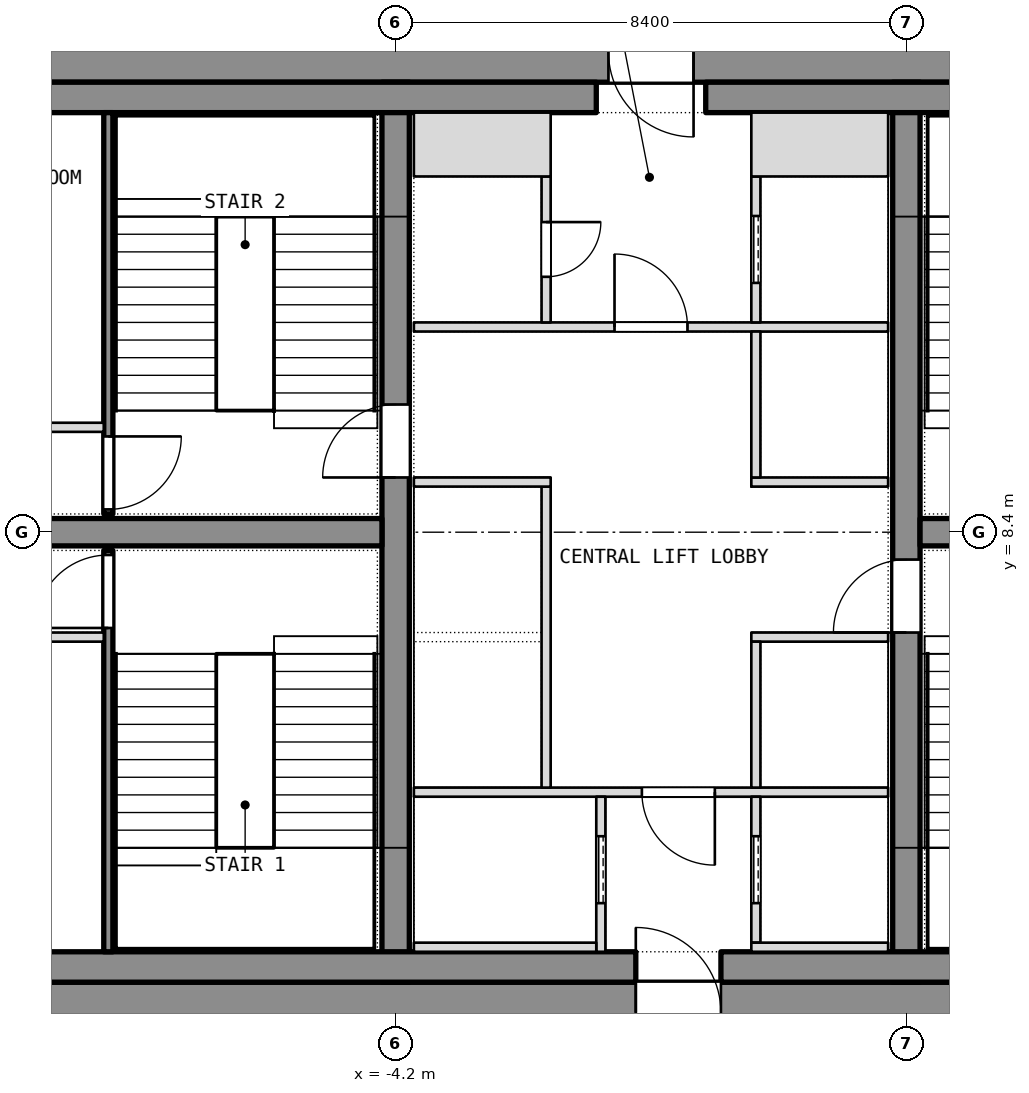
"""IFC4 building model, lengths in metres.
Left out: names, types, materials, properties, quantities, classifications, styles, units other than length and angle.
Written with IfcOpenShell. Run it as: python <this file> out.ifc"""

import sys

from ifc_helpers import new_model, si_unit, direction, frame, frame_2d, origin, place, context, subcontext, project, spatial, rectangle, extrude, element, fill, save


model = new_model("IFC4")
c1 = context("Model", 3, precision=1e-05, world=origin(), true_north=direction((0.0, 1.0)))
c2 = subcontext(c1, "Body", "Model", "MODEL_VIEW")
j1 = project(units=[si_unit("LENGTHUNIT", "METRE"), si_unit("PLANEANGLEUNIT", "RADIAN")], contexts=[c1])
p1 = place(None, origin())
s1 = spatial("IfcSite", under=j1, at=p1, CompositionType="ELEMENT")
p2 = place(p1, origin())
s2 = spatial("IfcBuilding", under=s1, at=p2, CompositionType="ELEMENT")
p3 = place(p2, frame((0.0, 0.0, 133.7)))
s3 = spatial("IfcBuildingStorey", under=s2, at=p3, CompositionType="ELEMENT", Elevation=133.7)
p4 = place(p3, frame((-11.1, 0.5, 0.0), z_axis=(0.0, 0.0, 1.0), x_axis=(1.0, 0.0, 0.0)))
e1 = element("IfcWall", 1, at=p4, inside=s3, PredefinedType="SHEAR", context=c2, shape_type="SweptSolid", body=[
    extrude(rectangle(XDim=22.2, YDim=1.0, at=frame_2d((11.1, 0.0))), origin(), (0.0, 0.0, 1.0), 3.6),
])
p5 = place(p4, frame((10.85, 0.0, 0.0)))
e2 = element("IfcOpeningElement", 2, at=p5, cuts=e1, PredefinedType="OPENING", context=c2, shape_type="SweptSolid", body=[
    extrude(rectangle(XDim=1.4, YDim=2.1, at=frame_2d((0.7, 1.05))), frame((0.0, 0.5, 0.0), z_axis=(0.0, -1.0, 0.0), x_axis=(1.0, 0.0, 0.0)), (0.0, 0.0, 1.0), 1.0),
])
p6 = place(p3, frame((-11.1, 16.3, 0.0), z_axis=(0.0, 0.0, 1.0), x_axis=(1.0, 0.0, 0.0)))
e3 = element("IfcWall", 3, at=p6, inside=s3, PredefinedType="SHEAR", context=c2, shape_type="SweptSolid", body=[
    extrude(rectangle(XDim=22.2, YDim=1.0, at=frame_2d((11.1, 0.0))), origin(), (0.0, 0.0, 1.0), 3.6),
])
p7 = place(p6, frame((10.4, 0.0, 0.0)))
e4 = element("IfcOpeningElement", 4, at=p7, cuts=e3, PredefinedType="OPENING", context=c2, shape_type="SweptSolid", body=[
    extrude(rectangle(XDim=1.4, YDim=2.1, at=frame_2d((0.7, 1.05))), frame((0.0, 0.5, 0.0), z_axis=(0.0, -1.0, 0.0), x_axis=(1.0, 0.0, 0.0)), (0.0, 0.0, 1.0), 1.0),
])
p8 = place(p3, frame((-4.2, 1.0, 0.0), z_axis=(0.0, 0.0, 1.0), x_axis=(0.0, 1.0, 0.0)))
e5 = element("IfcWall", 5, at=p8, inside=s3, PredefinedType="SHEAR", context=c2, shape_type="SweptSolid", body=[
    extrude(rectangle(XDim=14.8, YDim=0.45, at=frame_2d((7.4, 0.0))), origin(), (0.0, 0.0, 1.0), 3.6),
])
p9 = place(p8, frame((8.3, 0.0, 0.0)))
e6 = element("IfcOpeningElement", 6, at=p9, cuts=e5, PredefinedType="OPENING", context=c2, shape_type="SweptSolid", body=[
    extrude(rectangle(XDim=1.2, YDim=2.1, at=frame_2d((0.6, 1.05))), frame((0.0, 0.225, 0.0), z_axis=(0.0, -1.0, 0.0), x_axis=(1.0, 0.0, 0.0)), (0.0, 0.0, 1.0), 0.45),
])
p10 = place(p3, frame((4.2, 1.0, 0.0), z_axis=(0.0, 0.0, 1.0), x_axis=(0.0, 1.0, 0.0)))
e7 = element("IfcWall", 7, at=p10, inside=s3, PredefinedType="SHEAR", context=c2, shape_type="SweptSolid", body=[
    extrude(rectangle(XDim=14.8, YDim=0.45, at=frame_2d((7.4, 0.0))), origin(), (0.0, 0.0, 1.0), 3.6),
])
p11 = place(p10, frame((5.75, 0.0, 0.0)))
e8 = element("IfcOpeningElement", 8, at=p11, cuts=e7, PredefinedType="OPENING", context=c2, shape_type="SweptSolid", body=[
    extrude(rectangle(XDim=1.2, YDim=2.1, at=frame_2d((0.6, 1.05))), frame((0.0, 0.225, 0.0), z_axis=(0.0, -1.0, 0.0), x_axis=(1.0, 0.0, 0.0)), (0.0, 0.0, 1.0), 0.45),
])
for number, where, z_axis, x_axis in (
    (9, (-11.1, 8.4, 0.0), (0.0, 0.0, 1.0), (1.0, 0.0, 0.0)),
    (10, (4.425, 8.4, 0.0), (0.0, 0.0, 1.0), (1.0, 0.0, 0.0)),
):
    element("IfcWall", number, at=place(p3, frame(where, z_axis=z_axis, x_axis=x_axis)), inside=s3, PredefinedType="SHEAR", context=c2, shape_type="SweptSolid", body=[
        extrude(rectangle(XDim=6.675, YDim=0.45, at=frame_2d((3.337, 0.0))), origin(), (0.0, 0.0, 1.0), 3.6),
    ])
p12 = place(p3, frame((-11.1, 1.25, 0.0), z_axis=(0.0, 0.0, 1.0), x_axis=(1.0, 0.0, 0.0)))
e11 = element("IfcWall", 11, at=p12, inside=s3, PredefinedType="PARTITIONING", context=c2, shape_type="SweptSolid", body=[
    extrude(rectangle(XDim=10.85, YDim=0.5, at=frame_2d((5.425, 0.0))), origin(), (0.0, 0.0, 1.0), 3.34),
])
p13 = place(p3, frame((1.15, 1.25, 0.0), z_axis=(0.0, 0.0, 1.0), x_axis=(1.0, 0.0, 0.0)))
e12 = element("IfcWall", 12, at=p13, inside=s3, PredefinedType="PARTITIONING", context=c2, shape_type="SweptSolid", body=[
    extrude(rectangle(XDim=9.95, YDim=0.5, at=frame_2d((4.975, 0.0))), origin(), (0.0, 0.0, 1.0), 3.34),
])
for number, where, z_axis, x_axis in (
    (13, (-11.1, 15.55, 0.0), (0.0, 0.0, 1.0), (1.0, 0.0, 0.0)),
    (14, (0.9, 15.55, 0.0), (0.0, 0.0, 1.0), (1.0, 0.0, 0.0)),
):
    element("IfcWall", number, at=place(p3, frame(where, z_axis=z_axis, x_axis=x_axis)), inside=s3, PredefinedType="PARTITIONING", context=c2, shape_type="SweptSolid", body=[
        extrude(rectangle(XDim=10.2, YDim=0.5, at=frame_2d((5.1, 0.0))), origin(), (0.0, 0.0, 1.0), 3.34),
    ])
p14 = place(p3, frame((-8.925, 1.5, 0.0), z_axis=(0.0, 0.0, 1.0), x_axis=(0.0, 1.0, 0.0)))
e15 = element("IfcWall", 15, at=p14, inside=s3, PredefinedType="SHEAR", context=c2, shape_type="SweptSolid", body=[
    extrude(rectangle(XDim=6.6, YDim=0.15, at=frame_2d((3.3, 0.0))), origin(), (0.0, 0.0, 1.0), 3.34),
])
p15 = place(p14, frame((5.325, 0.0, 0.0)))
e16 = element("IfcOpeningElement", 16, at=p15, cuts=e15, PredefinedType="OPENING", context=c2, shape_type="SweptSolid", body=[
    extrude(rectangle(XDim=1.2, YDim=2.1, at=frame_2d((0.6, 1.05))), frame((0.0, 0.075, 0.0), z_axis=(0.0, -1.0, 0.0), x_axis=(1.0, 0.0, 0.0)), (0.0, 0.0, 1.0), 0.15),
])
p16 = place(p3, frame((-11.1, 6.675, 0.0), z_axis=(0.0, 0.0, 1.0), x_axis=(1.0, 0.0, 0.0)))
e17 = element("IfcWall", 17, at=p16, inside=s3, PredefinedType="PARTITIONING", context=c2, shape_type="SweptSolid", body=[
    extrude(rectangle(XDim=2.1, YDim=0.15, at=frame_2d((1.05, 0.0))), origin(), (0.0, 0.0, 1.0), 3.34),
])
p17 = place(p3, frame((-8.925, 8.7, 0.0), z_axis=(0.0, 0.0, 1.0), x_axis=(0.0, 1.0, 0.0)))
e18 = element("IfcWall", 18, at=p17, inside=s3, PredefinedType="SHEAR", context=c2, shape_type="SweptSolid", body=[
    extrude(rectangle(XDim=6.6, YDim=0.15, at=frame_2d((3.3, 0.0))), origin(), (0.0, 0.0, 1.0), 3.34),
])
p18 = place(p17, frame((0.075, 0.0, 0.0)))
e19 = element("IfcOpeningElement", 19, at=p18, cuts=e18, PredefinedType="OPENING", context=c2, shape_type="SweptSolid", body=[
    extrude(rectangle(XDim=1.2, YDim=2.1, at=frame_2d((0.6, 1.05))), frame((0.0, 0.075, 0.0), z_axis=(0.0, -1.0, 0.0), x_axis=(1.0, 0.0, 0.0)), (0.0, 0.0, 1.0), 0.15),
])
p19 = place(p3, frame((-11.1, 10.125, 0.0), z_axis=(0.0, 0.0, 1.0), x_axis=(1.0, 0.0, 0.0)))
e20 = element("IfcWall", 20, at=p19, inside=s3, PredefinedType="PARTITIONING", context=c2, shape_type="SweptSolid", body=[
    extrude(rectangle(XDim=2.1, YDim=0.15, at=frame_2d((1.05, 0.0))), origin(), (0.0, 0.0, 1.0), 3.34),
])
p20 = place(p3, frame((-3.9, 4.125, 0.0), z_axis=(0.0, 0.0, 1.0), x_axis=(1.0, 0.0, 0.0)))
e21 = element("IfcWall", 21, at=p20, inside=s3, PredefinedType="PARTITIONING", context=c2, shape_type="SweptSolid", body=[
    extrude(rectangle(XDim=7.8, YDim=0.15, at=frame_2d((3.9, 0.0))), origin(), (0.0, 0.0, 1.0), 3.34),
])
p21 = place(p20, frame((3.75, 0.0, 0.0)))
e22 = element("IfcOpeningElement", 22, at=p21, cuts=e21, PredefinedType="OPENING", context=c2, shape_type="SweptSolid", body=[
    extrude(rectangle(XDim=1.2, YDim=2.1, at=frame_2d((0.6, 1.05))), frame((0.0, 0.075, 0.0), z_axis=(0.0, -1.0, 0.0), x_axis=(1.0, 0.0, 0.0)), (0.0, 0.0, 1.0), 0.15),
])
p22 = place(p3, frame((-3.9, 11.775, 0.0), z_axis=(0.0, 0.0, 1.0), x_axis=(1.0, 0.0, 0.0)))
e23 = element("IfcWall", 23, at=p22, inside=s3, PredefinedType="PARTITIONING", context=c2, shape_type="SweptSolid", body=[
    extrude(rectangle(XDim=7.8, YDim=0.15, at=frame_2d((3.9, 0.0))), origin(), (0.0, 0.0, 1.0), 3.34),
])
p23 = place(p22, frame((3.3, 0.0, 0.0)))
e24 = element("IfcOpeningElement", 24, at=p23, cuts=e23, PredefinedType="OPENING", context=c2, shape_type="SweptSolid", body=[
    extrude(rectangle(XDim=1.2, YDim=2.1, at=frame_2d((0.6, 1.05))), frame((0.0, 0.075, 0.0), z_axis=(0.0, -1.0, 0.0), x_axis=(1.0, 0.0, 0.0)), (0.0, 0.0, 1.0), 0.15),
])
p24 = place(p3, frame((-0.825, 1.5, 0.0), z_axis=(0.0, 0.0, 1.0), x_axis=(0.0, 1.0, 0.0)))
e25 = element("IfcWall", 25, at=p24, inside=s3, PredefinedType="SHEAR", context=c2, shape_type="SweptSolid", body=[
    extrude(rectangle(XDim=2.55, YDim=0.15, at=frame_2d((1.275, 0.0))), origin(), (0.0, 0.0, 1.0), 3.6),
])
p25 = place(p24, frame((0.8, 0.0, 0.0)))
e26 = element("IfcOpeningElement", 26, at=p25, cuts=e25, PredefinedType="OPENING", context=c2, shape_type="SweptSolid", body=[
    extrude(rectangle(XDim=1.1, YDim=2.1, at=frame_2d((0.55, 1.05))), frame((0.0, 0.075, 0.0), z_axis=(0.0, -1.0, 0.0), x_axis=(1.0, 0.0, 0.0)), (0.0, 0.0, 1.0), 0.15),
])
p26 = place(p3, frame((-3.9, 1.575, 0.0), z_axis=(0.0, 0.0, 1.0), x_axis=(1.0, 0.0, 0.0)))
e27 = element("IfcWall", 27, at=p26, inside=s3, PredefinedType="SHEAR", context=c2, shape_type="SweptSolid", body=[
    extrude(rectangle(XDim=3.0, YDim=0.15, at=frame_2d((1.5, 0.0))), origin(), (0.0, 0.0, 1.0), 3.6),
])
p27 = place(p3, frame((-1.725, 4.2, 0.0), z_axis=(0.0, 0.0, 1.0), x_axis=(0.0, 1.0, 0.0)))
e28 = element("IfcWall", 28, at=p27, inside=s3, PredefinedType="SHEAR", context=c2, shape_type="SweptSolid", body=[
    extrude(rectangle(XDim=4.95, YDim=0.15, at=frame_2d((2.475, 0.0))), origin(), (0.0, 0.0, 1.0), 3.6),
])
p28 = place(p3, frame((-3.9, 9.225, 0.0), z_axis=(0.0, 0.0, 1.0), x_axis=(1.0, 0.0, 0.0)))
e29 = element("IfcWall", 29, at=p28, inside=s3, PredefinedType="SHEAR", context=c2, shape_type="SweptSolid", body=[
    extrude(rectangle(XDim=2.25, YDim=0.15, at=frame_2d((1.125, 0.0))), origin(), (0.0, 0.0, 1.0), 3.6),
])
p29 = place(p3, frame((-1.725, 11.85, 0.0), z_axis=(0.0, 0.0, 1.0), x_axis=(0.0, 1.0, 0.0)))
e30 = element("IfcWall", 30, at=p29, inside=s3, PredefinedType="PARTITIONING", context=c2, shape_type="SweptSolid", body=[
    extrude(rectangle(XDim=2.4, YDim=0.15, at=frame_2d((1.2, 0.0))), origin(), (0.0, 0.0, 1.0), 3.34),
])
p30 = place(p29, frame((0.75, 0.0, 0.0)))
e31 = element("IfcOpeningElement", 31, at=p30, cuts=e30, PredefinedType="OPENING", context=c2, shape_type="SweptSolid", body=[
    extrude(rectangle(XDim=0.9, YDim=2.1, at=frame_2d((0.45, 1.05))), frame((0.0, 0.075, 0.0), z_axis=(0.0, -1.0, 0.0), x_axis=(1.0, 0.0, 0.0)), (0.0, 0.0, 1.0), 0.15),
])
p31 = place(p3, frame((-3.9, 14.775, 0.0), z_axis=(0.0, 0.0, 1.0), x_axis=(1.0, 0.0, 0.0)))
e32 = element("IfcWall", 32, at=p31, inside=s3, PredefinedType="PARTITIONING", context=c2, shape_type="SweptSolid", body=[
    extrude(rectangle(XDim=2.25, YDim=1.05, at=frame_2d((1.125, 0.0))), origin(), (0.0, 0.0, 1.0), 3.34),
])
p32 = place(p3, frame((1.725, 1.65, 0.0), z_axis=(0.0, 0.0, 1.0), x_axis=(0.0, 1.0, 0.0)))
e33 = element("IfcWall", 33, at=p32, inside=s3, PredefinedType="SHEAR", context=c2, shape_type="SweptSolid", body=[
    extrude(rectangle(XDim=2.4, YDim=0.15, at=frame_2d((1.2, 0.0))), origin(), (0.0, 0.0, 1.0), 3.6),
])
p33 = place(p32, frame((0.65, 0.0, 0.0)))
e34 = element("IfcOpeningElement", 34, at=p33, cuts=e33, PredefinedType="OPENING", context=c2, shape_type="SweptSolid", body=[
    extrude(rectangle(XDim=1.1, YDim=2.1, at=frame_2d((0.55, 1.05))), frame((0.0, 0.075, 0.0), z_axis=(0.0, -1.0, 0.0), x_axis=(1.0, 0.0, 0.0)), (0.0, 0.0, 1.0), 0.15),
])
p34 = place(p3, frame((1.65, 1.575, 0.0), z_axis=(0.0, 0.0, 1.0), x_axis=(1.0, 0.0, 0.0)))
e35 = element("IfcWall", 35, at=p34, inside=s3, PredefinedType="SHEAR", context=c2, shape_type="SweptSolid", body=[
    extrude(rectangle(XDim=2.25, YDim=0.15, at=frame_2d((1.125, 0.0))), origin(), (0.0, 0.0, 1.0), 3.6),
])
p35 = place(p3, frame((1.725, 11.85, 0.0), z_axis=(0.0, 0.0, 1.0), x_axis=(0.0, 1.0, 0.0)))
e36 = element("IfcWall", 36, at=p35, inside=s3, PredefinedType="SHEAR", context=c2, shape_type="SweptSolid", body=[
    extrude(rectangle(XDim=2.4, YDim=0.15, at=frame_2d((1.2, 0.0))), origin(), (0.0, 0.0, 1.0), 3.6),
])
p36 = place(p35, frame((0.65, 0.0, 0.0)))
e37 = element("IfcOpeningElement", 37, at=p36, cuts=e36, PredefinedType="OPENING", context=c2, shape_type="SweptSolid", body=[
    extrude(rectangle(XDim=1.1, YDim=2.1, at=frame_2d((0.55, 1.05))), frame((0.0, 0.075, 0.0), z_axis=(0.0, -1.0, 0.0), x_axis=(1.0, 0.0, 0.0)), (0.0, 0.0, 1.0), 0.15),
])
p37 = place(p3, frame((1.65, 14.775, 0.0), z_axis=(0.0, 0.0, 1.0), x_axis=(1.0, 0.0, 0.0)))
e38 = element("IfcWall", 38, at=p37, inside=s3, PredefinedType="SHEAR", context=c2, shape_type="SweptSolid", body=[
    extrude(rectangle(XDim=2.25, YDim=1.05, at=frame_2d((1.125, 0.0))), origin(), (0.0, 0.0, 1.0), 3.6),
])
for number, where, z_axis, x_axis in (
    (39, (1.65, 6.675, 0.0), (0.0, 0.0, 1.0), (1.0, 0.0, 0.0)),
    (40, (1.65, 9.225, 0.0), (0.0, 0.0, 1.0), (1.0, 0.0, 0.0)),
):
    element("IfcWall", number, at=place(p3, frame(where, z_axis=z_axis, x_axis=x_axis)), inside=s3, PredefinedType="SHEAR", context=c2, shape_type="SweptSolid", body=[
        extrude(rectangle(XDim=2.25, YDim=0.15, at=frame_2d((1.125, 0.0))), origin(), (0.0, 0.0, 1.0), 3.6),
    ])
p38 = place(p3, frame((1.725, 4.2, 0.0), z_axis=(0.0, 0.0, 1.0), x_axis=(0.0, 1.0, 0.0)))
e41 = element("IfcWall", 41, at=p38, inside=s3, PredefinedType="SHEAR", context=c2, shape_type="SweptSolid", body=[
    extrude(rectangle(XDim=2.4, YDim=0.15, at=frame_2d((1.2, 0.0))), origin(), (0.0, 0.0, 1.0), 3.6),
])
p39 = place(p3, frame((1.725, 9.3, 0.0), z_axis=(0.0, 0.0, 1.0), x_axis=(0.0, 1.0, 0.0)))
e42 = element("IfcWall", 42, at=p39, inside=s3, PredefinedType="SHEAR", context=c2, shape_type="SweptSolid", body=[
    extrude(rectangle(XDim=2.4, YDim=0.15, at=frame_2d((1.2, 0.0))), origin(), (0.0, 0.0, 1.0), 3.6),
])
p40 = place(p15, origin())
e43 = element("IfcDoor", 43, at=p40, inside=s3, OperationType="SINGLE_SWING_LEFT", PredefinedType="DOOR", context=c2, shape_type="SweptSolid", body=[
    extrude(rectangle(XDim=1.2, YDim=2.1, at=frame_2d((0.6, 1.05))), frame((0.0, 0.025, 0.0), z_axis=(0.0, -1.0, 0.0), x_axis=(1.0, 0.0, 0.0)), (0.0, 0.0, 1.0), 0.05),
])
fill(e16, e43)
p41 = place(p18, origin())
e44 = element("IfcDoor", 44, at=p41, inside=s3, OperationType="SINGLE_SWING_LEFT", PredefinedType="DOOR", context=c2, shape_type="SweptSolid", body=[
    extrude(rectangle(XDim=1.2, YDim=2.1, at=frame_2d((0.6, 1.05))), frame((0.0, 0.025, 0.0), z_axis=(0.0, -1.0, 0.0), x_axis=(1.0, 0.0, 0.0)), (0.0, 0.0, 1.0), 0.05),
])
fill(e19, e44)
p42 = place(p25, origin())
e45 = element("IfcDoor", 45, at=p42, inside=s3, OperationType="SLIDING_TO_LEFT", PredefinedType="DOOR", context=c2, shape_type="SweptSolid", body=[
    extrude(rectangle(XDim=1.1, YDim=2.1, at=frame_2d((0.55, 1.05))), frame((0.0, 0.025, 0.0), z_axis=(0.0, -1.0, 0.0), x_axis=(1.0, 0.0, 0.0)), (0.0, 0.0, 1.0), 0.05),
])
fill(e26, e45)
p43 = place(p33, origin())
e46 = element("IfcDoor", 46, at=p43, inside=s3, OperationType="SLIDING_TO_LEFT", PredefinedType="DOOR", context=c2, shape_type="SweptSolid", body=[
    extrude(rectangle(XDim=1.1, YDim=2.1, at=frame_2d((0.55, 1.05))), frame((0.0, 0.025, 0.0), z_axis=(0.0, -1.0, 0.0), x_axis=(1.0, 0.0, 0.0)), (0.0, 0.0, 1.0), 0.05),
])
fill(e34, e46)
p44 = place(p36, origin())
e47 = element("IfcDoor", 47, at=p44, inside=s3, OperationType="SLIDING_TO_LEFT", PredefinedType="DOOR", context=c2, shape_type="SweptSolid", body=[
    extrude(rectangle(XDim=1.1, YDim=2.1, at=frame_2d((0.55, 1.05))), frame((0.0, 0.025, 0.0), z_axis=(0.0, -1.0, 0.0), x_axis=(1.0, 0.0, 0.0)), (0.0, 0.0, 1.0), 0.05),
])
fill(e37, e47)
p45 = place(p21, origin())
e48 = element("IfcDoor", 48, at=p45, inside=s3, OperationType="SINGLE_SWING_LEFT", PredefinedType="DOOR", context=c2, shape_type="SweptSolid", body=[
    extrude(rectangle(XDim=1.2, YDim=2.1, at=frame_2d((0.6, 1.05))), frame((0.0, 0.025, 0.0), z_axis=(0.0, -1.0, 0.0), x_axis=(1.0, 0.0, 0.0)), (0.0, 0.0, 1.0), 0.05),
])
fill(e22, e48)
p46 = place(p23, origin())
e49 = element("IfcDoor", 49, at=p46, inside=s3, OperationType="SINGLE_SWING_LEFT", PredefinedType="DOOR", context=c2, shape_type="SweptSolid", body=[
    extrude(rectangle(XDim=1.2, YDim=2.1, at=frame_2d((0.6, 1.05))), frame((0.0, 0.025, 0.0), z_axis=(0.0, -1.0, 0.0), x_axis=(1.0, 0.0, 0.0)), (0.0, 0.0, 1.0), 0.05),
])
fill(e24, e49)
p47 = place(p30, origin())
e50 = element("IfcDoor", 50, at=p47, inside=s3, OperationType="SINGLE_SWING_LEFT", PredefinedType="DOOR", context=c2, shape_type="SweptSolid", body=[
    extrude(rectangle(XDim=0.9, YDim=2.1, at=frame_2d((0.45, 1.05))), frame((0.0, 0.025, 0.0), z_axis=(0.0, -1.0, 0.0), x_axis=(1.0, 0.0, 0.0)), (0.0, 0.0, 1.0), 0.05),
])
fill(e31, e50)
p48 = place(p9, origin())
e51 = element("IfcDoor", 51, at=p48, inside=s3, OperationType="SINGLE_SWING_LEFT", PredefinedType="DOOR", context=c2, shape_type="SweptSolid", body=[
    extrude(rectangle(XDim=1.2, YDim=2.1, at=frame_2d((0.6, 1.05))), frame((0.0, 0.025, 0.0), z_axis=(0.0, -1.0, 0.0), x_axis=(1.0, 0.0, 0.0)), (0.0, 0.0, 1.0), 0.05),
])
fill(e6, e51)
p49 = place(p11, origin())
e52 = element("IfcDoor", 52, at=p49, inside=s3, OperationType="SINGLE_SWING_LEFT", PredefinedType="DOOR", context=c2, shape_type="SweptSolid", body=[
    extrude(rectangle(XDim=1.2, YDim=2.1, at=frame_2d((0.6, 1.05))), frame((0.0, 0.025, 0.0), z_axis=(0.0, -1.0, 0.0), x_axis=(1.0, 0.0, 0.0)), (0.0, 0.0, 1.0), 0.05),
])
fill(e8, e52)
p50 = place(p7, origin())
e53 = element("IfcDoor", 53, at=p50, inside=s3, OperationType="SINGLE_SWING_LEFT", PredefinedType="DOOR", context=c2, shape_type="SweptSolid", body=[
    extrude(rectangle(XDim=1.4, YDim=2.1, at=frame_2d((0.7, 1.05))), frame((0.0, 0.025, 0.0), z_axis=(0.0, -1.0, 0.0), x_axis=(1.0, 0.0, 0.0)), (0.0, 0.0, 1.0), 0.05),
])
fill(e4, e53)
p51 = place(p5, origin())
e54 = element("IfcDoor", 54, at=p51, inside=s3, OperationType="SINGLE_SWING_LEFT", PredefinedType="DOOR", context=c2, shape_type="SweptSolid", body=[
    extrude(rectangle(XDim=1.4, YDim=2.1, at=frame_2d((0.7, 1.05))), frame((0.0, 0.025, 0.0), z_axis=(0.0, -1.0, 0.0), x_axis=(1.0, 0.0, 0.0)), (0.0, 0.0, 1.0), 0.05),
])
fill(e2, e54)
save(model, sys.argv[1])
